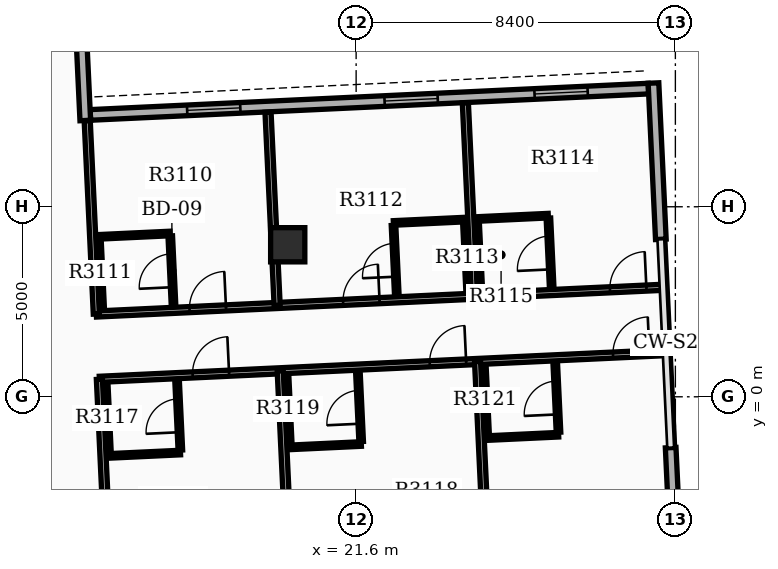
"""IFC4 building model, lengths in metres.
Left out: names, types, materials, properties, quantities, classifications, styles, units other than length and angle.
Written with IfcOpenShell. Run it as: python <this file> out.ifc"""

import sys

from ifc_helpers import new_model, si_unit, direction, frame, frame_2d, origin, origin_2d, place, context, subcontext, project, spatial, rectangle, extrude, element, fill, save


model = new_model("IFC4")
c1 = context("Model", 3, precision=1e-05, world=origin(), true_north=direction((0.0, 1.0)))
c2 = subcontext(c1, "Body", "Model", "MODEL_VIEW")
j1 = project(units=[si_unit("LENGTHUNIT", "METRE"), si_unit("PLANEANGLEUNIT", "RADIAN")], contexts=[c1])
p1 = place(None, origin())
s1 = spatial("IfcSite", under=j1, at=p1, CompositionType="ELEMENT")
p2 = place(p1, origin())
s2 = spatial("IfcBuilding", under=s1, at=p2, CompositionType="ELEMENT")
p3 = place(p2, frame((0.0, 0.0, 196.8)))
s3 = spatial("IfcBuildingStorey", under=s2, at=p3, CompositionType="ELEMENT", Elevation=196.8)
p4 = place(p3, frame((19.8, 4.0, 0.0), z_axis=(0.0, 0.0, 1.0), x_axis=(1.0, 0.0, 0.0)))
e1 = element("IfcColumn", 1, at=p4, inside=s3, PredefinedType="COLUMN", context=c2, shape_type="SweptSolid", body=[
    extrude(rectangle(XDim=0.9, YDim=0.9, at=origin_2d()), origin(), (0.0, 0.0, 1.0), 4.5),
])
p5 = place(p3, frame((29.291, 8.109, 0.0), z_axis=(0.0, 0.0, 1.0), x_axis=(-0.998889342735, -0.047117735191, 0.0)))
e2 = element("IfcWall", 2, at=p5, inside=s3, PredefinedType="STANDARD", context=c2, shape_type="SweptSolid", body=[
    extrude(rectangle(XDim=14.7, YDim=0.28, at=frame_2d((7.35, 0.0))), origin(), (0.0, 0.0, 1.0), 3.38),
])
p6 = place(p5, frame((1.6, 0.0, 0.8)))
e3 = element("IfcOpeningElement", 3, at=p6, cuts=e2, PredefinedType="OPENING", context=c2, shape_type="SweptSolid", body=[
    extrude(rectangle(XDim=1.4, YDim=1.6, at=frame_2d((0.7, 0.8))), frame((0.0, 0.15, 0.0), z_axis=(0.0, -1.0, 0.0), x_axis=(1.0, 0.0, 0.0)), (0.0, 0.0, 1.0), 0.3),
])
p7 = place(p5, frame((5.55, 0.0, 0.8)))
e4 = element("IfcOpeningElement", 4, at=p7, cuts=e2, PredefinedType="OPENING", context=c2, shape_type="SweptSolid", body=[
    extrude(rectangle(XDim=1.4, YDim=1.6, at=frame_2d((0.7, 0.8))), frame((0.0, 0.15, 0.0), z_axis=(0.0, -1.0, 0.0), x_axis=(1.0, 0.0, 0.0)), (0.0, 0.0, 1.0), 0.3),
])
p8 = place(p5, frame((10.75, 0.0, 0.8)))
e5 = element("IfcOpeningElement", 5, at=p8, cuts=e2, PredefinedType="OPENING", context=c2, shape_type="SweptSolid", body=[
    extrude(rectangle(XDim=1.4, YDim=1.6, at=frame_2d((0.7, 0.8))), frame((0.0, 0.15, 0.0), z_axis=(0.0, -1.0, 0.0), x_axis=(1.0, 0.0, 0.0)), (0.0, 0.0, 1.0), 0.3),
])
p9 = place(p3, frame((30.07, -5.45, 0.0), z_axis=(0.0, 0.0, 1.0), x_axis=(-0.047094531617, 0.998890436981, 0.0)))
e6 = element("IfcWall", 6, at=p9, inside=s3, PredefinedType="STANDARD", context=c2, shape_type="SweptSolid", body=[
    extrude(rectangle(XDim=4.116, YDim=0.28, at=frame_2d((2.058, 0.0))), origin(), (0.0, 0.0, 1.0), 3.38),
])
p10 = place(p3, frame((29.618, 4.144, 0.0), z_axis=(0.0, 0.0, 1.0), x_axis=(-0.047097322001, 0.998890305419, 0.0)))
e7 = element("IfcWall", 7, at=p10, inside=s3, PredefinedType="STANDARD", context=c2, shape_type="SweptSolid", body=[
    extrude(rectangle(XDim=4.116, YDim=0.28, at=frame_2d((2.058, 0.0))), origin(), (0.0, 0.0, 1.0), 3.38),
])
p11 = place(p3, frame((14.474, 7.27, 0.0), z_axis=(0.0, 0.0, 1.0), x_axis=(-0.04712043756, 0.998889215261, 0.0)))
e8 = element("IfcWall", 8, at=p11, inside=s3, PredefinedType="STANDARD", context=c2, shape_type="SweptSolid", body=[
    extrude(rectangle(XDim=6.86, YDim=0.28, at=frame_2d((3.43, 0.0))), origin(), (0.0, 0.0, 1.0), 3.38),
])
p12 = place(p3, frame((14.764, 2.178, 0.0), z_axis=(0.0, 0.0, 1.0), x_axis=(0.998890410031, 0.047095103231, 0.0)))
e9 = element("IfcWall", 9, at=p12, inside=s3, PredefinedType="PARTITIONING", context=c2, shape_type="SweptSolid", body=[
    extrude(rectangle(XDim=14.93, YDim=0.16, at=frame_2d((7.465, 0.0))), origin(), (0.0, 0.0, 1.0), 3.37),
])
p13 = place(p12, frame((2.456, 0.0, 0.0)))
e10 = element("IfcOpeningElement", 10, at=p13, cuts=e9, PredefinedType="OPENING", context=c2, shape_type="SweptSolid", body=[
    extrude(rectangle(XDim=0.96, YDim=2.15, at=frame_2d((0.48, 1.075))), frame((0.0, 0.09, 0.0), z_axis=(0.0, -1.0, 0.0), x_axis=(1.0, 0.0, 0.0)), (0.0, 0.0, 1.0), 0.18),
])
p14 = place(p12, frame((6.501, 0.0, 0.0)))
e11 = element("IfcOpeningElement", 11, at=p14, cuts=e9, PredefinedType="OPENING", context=c2, shape_type="SweptSolid", body=[
    extrude(rectangle(XDim=0.96, YDim=2.15, at=frame_2d((0.48, 1.075))), frame((0.0, 0.09, 0.0), z_axis=(0.0, -1.0, 0.0), x_axis=(1.0, 0.0, 0.0)), (0.0, 0.0, 1.0), 0.18),
])
p15 = place(p12, frame((13.53, 0.0, 0.0)))
e12 = element("IfcOpeningElement", 12, at=p15, cuts=e9, PredefinedType="OPENING", context=c2, shape_type="SweptSolid", body=[
    extrude(rectangle(XDim=0.96, YDim=2.15, at=frame_2d((0.48, 1.075))), frame((0.0, 0.09, 0.0), z_axis=(0.0, -1.0, 0.0), x_axis=(1.0, 0.0, 0.0)), (0.0, 0.0, 1.0), 0.18),
])
p16 = place(p3, frame((14.764, 2.178, 0.0), z_axis=(0.0, 0.0, 1.0), x_axis=(-0.047130059153, 0.998888761336, 0.0)))
e13 = element("IfcWall", 13, at=p16, inside=s3, PredefinedType="PARTITIONING", context=c2, shape_type="SweptSolid", body=[
    extrude(rectangle(XDim=5.092, YDim=0.16, at=frame_2d((2.546, 0.0))), origin(), (0.0, 0.0, 1.0), 3.37),
])
p17 = place(p3, frame((19.521, 2.402, 0.0), z_axis=(0.0, 0.0, 1.0), x_axis=(-0.047084475335, 0.998890911052, 0.0)))
e14 = element("IfcWall", 14, at=p17, inside=s3, PredefinedType="PARTITIONING", context=c2, shape_type="SweptSolid", body=[
    extrude(rectangle(XDim=5.092, YDim=0.16, at=frame_2d((2.546, 0.0))), origin(), (0.0, 0.0, 1.0), 3.37),
])
p18 = place(p3, frame((16.795, 2.414, 0.0), z_axis=(0.0, 0.0, 1.0), x_axis=(-0.047087116047, 0.998890786574, 0.0)))
e15 = element("IfcWall", 15, at=p18, inside=s3, PredefinedType="PARTITIONING", context=c2, shape_type="SweptSolid", body=[
    extrude(rectangle(XDim=1.82, YDim=0.12, at=frame_2d((0.91, 0.0))), origin(), (0.0, 0.0, 1.0), 3.37),
])
p19 = place(p18, frame((0.47, 0.0, 0.0)))
e16 = element("IfcOpeningElement", 16, at=p19, cuts=e15, PredefinedType="OPENING", context=c2, shape_type="SweptSolid", body=[
    extrude(rectangle(XDim=0.88, YDim=2.1, at=frame_2d((0.44, 1.05))), frame((0.0, 0.07, 0.0), z_axis=(0.0, -1.0, 0.0), x_axis=(1.0, 0.0, 0.0)), (0.0, 0.0, 1.0), 0.14),
])
p20 = place(p3, frame((14.917, 2.325, 0.0), z_axis=(0.0, 0.0, 1.0), x_axis=(-0.047080807099, 0.998891083954, 0.0)))
e17 = element("IfcWall", 17, at=p20, inside=s3, PredefinedType="PARTITIONING", context=c2, shape_type="SweptSolid", body=[
    extrude(rectangle(XDim=1.82, YDim=0.12, at=frame_2d((0.91, 0.0))), origin(), (0.0, 0.0, 1.0), 3.37),
])
p21 = place(p3, frame((14.828, 4.208, 0.0), z_axis=(0.0, 0.0, 1.0), x_axis=(0.998894425757, 0.04700985207, 0.0)))
e18 = element("IfcWall", 18, at=p21, inside=s3, PredefinedType="PARTITIONING", context=c2, shape_type="SweptSolid", body=[
    extrude(rectangle(XDim=1.88, YDim=0.12, at=frame_2d((0.94, 0.0))), origin(), (0.0, 0.0, 1.0), 3.37),
])
p22 = place(p3, frame((24.714, 2.647, 0.0), z_axis=(0.0, 0.0, 1.0), x_axis=(-0.047084475335, 0.998890911052, 0.0)))
e19 = element("IfcWall", 19, at=p22, inside=s3, PredefinedType="PARTITIONING", context=c2, shape_type="SweptSolid", body=[
    extrude(rectangle(XDim=5.092, YDim=0.16, at=frame_2d((2.546, 0.0))), origin(), (0.0, 0.0, 1.0), 3.37),
])
p23 = place(p3, frame((22.669, 2.691, 0.0), z_axis=(0.0, 0.0, 1.0), x_axis=(-0.047087116047, 0.998890786574, 0.0)))
e20 = element("IfcWall", 20, at=p23, inside=s3, PredefinedType="PARTITIONING", context=c2, shape_type="SweptSolid", body=[
    extrude(rectangle(XDim=1.82, YDim=0.12, at=frame_2d((0.91, 0.0))), origin(), (0.0, 0.0, 1.0), 3.37),
])
p24 = place(p23, frame((0.47, 0.0, 0.0)))
e21 = element("IfcOpeningElement", 21, at=p24, cuts=e20, PredefinedType="OPENING", context=c2, shape_type="SweptSolid", body=[
    extrude(rectangle(XDim=0.88, YDim=2.1, at=frame_2d((0.44, 1.05))), frame((0.0, 0.07, 0.0), z_axis=(0.0, -1.0, 0.0), x_axis=(1.0, 0.0, 0.0)), (0.0, 0.0, 1.0), 0.14),
])
p25 = place(p3, frame((24.547, 2.779, 0.0), z_axis=(0.0, 0.0, 1.0), x_axis=(-0.047080807099, 0.998891083954, 0.0)))
e22 = element("IfcWall", 22, at=p25, inside=s3, PredefinedType="PARTITIONING", context=c2, shape_type="SweptSolid", body=[
    extrude(rectangle(XDim=1.82, YDim=0.12, at=frame_2d((0.91, 0.0))), origin(), (0.0, 0.0, 1.0), 3.37),
])
p26 = place(p3, frame((22.581, 4.574, 0.0), z_axis=(0.0, 0.0, 1.0), x_axis=(0.998888319371, 0.047139425368, 0.0)))
e23 = element("IfcWall", 23, at=p26, inside=s3, PredefinedType="PARTITIONING", context=c2, shape_type="SweptSolid", body=[
    extrude(rectangle(XDim=1.88, YDim=0.12, at=frame_2d((0.94, 0.0))), origin(), (0.0, 0.0, 1.0), 3.37),
])
p27 = place(p3, frame((26.745, 2.883, 0.0), z_axis=(0.0, 0.0, 1.0), x_axis=(-0.047087116047, 0.998890786574, 0.0)))
e24 = element("IfcWall", 24, at=p27, inside=s3, PredefinedType="PARTITIONING", context=c2, shape_type="SweptSolid", body=[
    extrude(rectangle(XDim=1.82, YDim=0.12, at=frame_2d((0.91, 0.0))), origin(), (0.0, 0.0, 1.0), 3.37),
])
p28 = place(p27, frame((0.47, 0.0, 0.0)))
e25 = element("IfcOpeningElement", 25, at=p28, cuts=e24, PredefinedType="OPENING", context=c2, shape_type="SweptSolid", body=[
    extrude(rectangle(XDim=0.88, YDim=2.1, at=frame_2d((0.44, 1.05))), frame((0.0, 0.07, 0.0), z_axis=(0.0, -1.0, 0.0), x_axis=(1.0, 0.0, 0.0)), (0.0, 0.0, 1.0), 0.14),
])
p29 = place(p3, frame((24.867, 2.794, 0.0), z_axis=(0.0, 0.0, 1.0), x_axis=(-0.047080807099, 0.998891083954, 0.0)))
e26 = element("IfcWall", 26, at=p29, inside=s3, PredefinedType="PARTITIONING", context=c2, shape_type="SweptSolid", body=[
    extrude(rectangle(XDim=1.82, YDim=0.12, at=frame_2d((0.91, 0.0))), origin(), (0.0, 0.0, 1.0), 3.37),
])
p30 = place(p3, frame((24.778, 4.677, 0.0), z_axis=(0.0, 0.0, 1.0), x_axis=(0.998888030748, 0.047145540913, 0.0)))
e27 = element("IfcWall", 27, at=p30, inside=s3, PredefinedType="PARTITIONING", context=c2, shape_type="SweptSolid", body=[
    extrude(rectangle(XDim=1.88, YDim=0.12, at=frame_2d((0.94, 0.0))), origin(), (0.0, 0.0, 1.0), 3.37),
])
p31 = place(p3, frame((14.845, 0.46, 0.0), z_axis=(0.0, 0.0, 1.0), x_axis=(0.998889676925, 0.047110649891, 0.0)))
e28 = element("IfcWall", 28, at=p31, inside=s3, PredefinedType="PARTITIONING", context=c2, shape_type="SweptSolid", body=[
    extrude(rectangle(XDim=14.93, YDim=0.16, at=frame_2d((7.465, 0.0))), origin(), (0.0, 0.0, 1.0), 3.37),
])
p32 = place(p31, frame((2.456, 0.0, 0.0)))
e29 = element("IfcOpeningElement", 29, at=p32, cuts=e28, PredefinedType="OPENING", context=c2, shape_type="SweptSolid", body=[
    extrude(rectangle(XDim=0.96, YDim=2.15, at=frame_2d((0.48, 1.075))), frame((0.0, 0.09, 0.0), z_axis=(0.0, -1.0, 0.0), x_axis=(1.0, 0.0, 0.0)), (0.0, 0.0, 1.0), 0.18),
])
p33 = place(p31, frame((8.701, 0.0, 0.0)))
e30 = element("IfcOpeningElement", 30, at=p33, cuts=e28, PredefinedType="OPENING", context=c2, shape_type="SweptSolid", body=[
    extrude(rectangle(XDim=0.96, YDim=2.15, at=frame_2d((0.48, 1.075))), frame((0.0, 0.09, 0.0), z_axis=(0.0, -1.0, 0.0), x_axis=(1.0, 0.0, 0.0)), (0.0, 0.0, 1.0), 0.18),
])
p34 = place(p31, frame((13.53, 0.0, 0.0)))
e31 = element("IfcOpeningElement", 31, at=p34, cuts=e28, PredefinedType="OPENING", context=c2, shape_type="SweptSolid", body=[
    extrude(rectangle(XDim=0.96, YDim=2.15, at=frame_2d((0.48, 1.075))), frame((0.0, 0.09, 0.0), z_axis=(0.0, -1.0, 0.0), x_axis=(1.0, 0.0, 0.0)), (0.0, 0.0, 1.0), 0.18),
])
for number, where, z_axis, x_axis in (
    (32, (14.845, 0.46, 0.0), (0.0, 0.0, 1.0), (0.047, -0.999, 0.0)),
    (33, (19.603, 0.684, 0.0), (0.0, 0.0, 1.0), (0.047, -0.999, 0.0)),
):
    element("IfcWall", number, at=place(p3, frame(where, z_axis=z_axis, x_axis=x_axis)), inside=s3, PredefinedType="PARTITIONING", context=c2, shape_type="SweptSolid", body=[
        extrude(rectangle(XDim=6.332, YDim=0.16, at=frame_2d((3.166, 0.0))), origin(), (0.0, 0.0, 1.0), 3.37),
    ])
p35 = place(p3, frame((16.975, -1.402, 0.0), z_axis=(0.0, 0.0, 1.0), x_axis=(-0.047087116047, 0.998890786574, 0.0)))
e34 = element("IfcWall", 34, at=p35, inside=s3, PredefinedType="PARTITIONING", context=c2, shape_type="SweptSolid", body=[
    extrude(rectangle(XDim=1.82, YDim=0.12, at=frame_2d((0.91, 0.0))), origin(), (0.0, 0.0, 1.0), 3.37),
])
p36 = place(p35, frame((0.47, 0.0, 0.0)))
e35 = element("IfcOpeningElement", 35, at=p36, cuts=e34, PredefinedType="OPENING", context=c2, shape_type="SweptSolid", body=[
    extrude(rectangle(XDim=0.88, YDim=2.1, at=frame_2d((0.44, 1.05))), frame((0.0, 0.07, 0.0), z_axis=(0.0, -1.0, 0.0), x_axis=(1.0, 0.0, 0.0)), (0.0, 0.0, 1.0), 0.14),
])
p37 = place(p3, frame((15.097, -1.49, 0.0), z_axis=(0.0, 0.0, 1.0), x_axis=(-0.047087116047, 0.998890786574, 0.0)))
e36 = element("IfcWall", 36, at=p37, inside=s3, PredefinedType="PARTITIONING", context=c2, shape_type="SweptSolid", body=[
    extrude(rectangle(XDim=1.82, YDim=0.12, at=frame_2d((0.91, 0.0))), origin(), (0.0, 0.0, 1.0), 3.37),
])
p38 = place(p3, frame((15.1, -1.555, 0.0), z_axis=(0.0, 0.0, 1.0), x_axis=(0.998888030748, 0.047145540913, 0.0)))
e37 = element("IfcWall", 37, at=p38, inside=s3, PredefinedType="PARTITIONING", context=c2, shape_type="SweptSolid", body=[
    extrude(rectangle(XDim=1.88, YDim=0.12, at=frame_2d((0.94, 0.0))), origin(), (0.0, 0.0, 1.0), 3.37),
])
p39 = place(p3, frame((24.795, 0.929, 0.0), z_axis=(0.0, 0.0, 1.0), x_axis=(0.047077862468, -0.998891222739, 0.0)))
e38 = element("IfcWall", 38, at=p39, inside=s3, PredefinedType="PARTITIONING", context=c2, shape_type="SweptSolid", body=[
    extrude(rectangle(XDim=6.332, YDim=0.16, at=frame_2d((3.166, 0.0))), origin(), (0.0, 0.0, 1.0), 3.37),
])
p40 = place(p3, frame((21.733, -1.177, 0.0), z_axis=(0.0, 0.0, 1.0), x_axis=(-0.047087116047, 0.998890786574, 0.0)))
e39 = element("IfcWall", 39, at=p40, inside=s3, PredefinedType="PARTITIONING", context=c2, shape_type="SweptSolid", body=[
    extrude(rectangle(XDim=1.82, YDim=0.12, at=frame_2d((0.91, 0.0))), origin(), (0.0, 0.0, 1.0), 3.37),
])
p41 = place(p40, frame((0.47, 0.0, 0.0)))
e40 = element("IfcOpeningElement", 40, at=p41, cuts=e39, PredefinedType="OPENING", context=c2, shape_type="SweptSolid", body=[
    extrude(rectangle(XDim=0.88, YDim=2.1, at=frame_2d((0.44, 1.05))), frame((0.0, 0.07, 0.0), z_axis=(0.0, -1.0, 0.0), x_axis=(1.0, 0.0, 0.0)), (0.0, 0.0, 1.0), 0.14),
])
p42 = place(p3, frame((19.855, -1.266, 0.0), z_axis=(0.0, 0.0, 1.0), x_axis=(-0.047214641863, 0.998884766924, 0.0)))
e41 = element("IfcWall", 41, at=p42, inside=s3, PredefinedType="PARTITIONING", context=c2, shape_type="SweptSolid", body=[
    extrude(rectangle(XDim=1.82, YDim=0.12, at=frame_2d((0.91, 0.0))), origin(), (0.0, 0.0, 1.0), 3.37),
])
p43 = place(p3, frame((19.858, -1.331, 0.0), z_axis=(0.0, 0.0, 1.0), x_axis=(0.998888319371, 0.047139425368, 0.0)))
e42 = element("IfcWall", 42, at=p43, inside=s3, PredefinedType="PARTITIONING", context=c2, shape_type="SweptSolid", body=[
    extrude(rectangle(XDim=1.88, YDim=0.12, at=frame_2d((0.94, 0.0))), origin(), (0.0, 0.0, 1.0), 3.37),
])
p44 = place(p3, frame((26.925, -0.933, 0.0), z_axis=(0.0, 0.0, 1.0), x_axis=(-0.047087116047, 0.998890786574, 0.0)))
e43 = element("IfcWall", 43, at=p44, inside=s3, PredefinedType="PARTITIONING", context=c2, shape_type="SweptSolid", body=[
    extrude(rectangle(XDim=1.82, YDim=0.12, at=frame_2d((0.91, 0.0))), origin(), (0.0, 0.0, 1.0), 3.37),
])
p45 = place(p44, frame((0.47, 0.0, 0.0)))
e44 = element("IfcOpeningElement", 44, at=p45, cuts=e43, PredefinedType="OPENING", context=c2, shape_type="SweptSolid", body=[
    extrude(rectangle(XDim=0.88, YDim=2.1, at=frame_2d((0.44, 1.05))), frame((0.0, 0.07, 0.0), z_axis=(0.0, -1.0, 0.0), x_axis=(1.0, 0.0, 0.0)), (0.0, 0.0, 1.0), 0.14),
])
p46 = place(p3, frame((25.047, -1.021, 0.0), z_axis=(0.0, 0.0, 1.0), x_axis=(-0.047087116047, 0.998890786574, 0.0)))
e45 = element("IfcWall", 45, at=p46, inside=s3, PredefinedType="PARTITIONING", context=c2, shape_type="SweptSolid", body=[
    extrude(rectangle(XDim=1.82, YDim=0.12, at=frame_2d((0.91, 0.0))), origin(), (0.0, 0.0, 1.0), 3.37),
])
p47 = place(p3, frame((25.05, -1.086, 0.0), z_axis=(0.0, 0.0, 1.0), x_axis=(0.998888319371, 0.047139425368, 0.0)))
e46 = element("IfcWall", 46, at=p47, inside=s3, PredefinedType="PARTITIONING", context=c2, shape_type="SweptSolid", body=[
    extrude(rectangle(XDim=1.88, YDim=0.12, at=frame_2d((0.94, 0.0))), origin(), (0.0, 0.0, 1.0), 3.37),
])
p48 = place(p6, origin())
e47 = element("IfcWindow", 47, at=p48, inside=s3, PartitioningType="SINGLE_PANEL", PredefinedType="WINDOW", context=c2, shape_type="SweptSolid", body=[
    extrude(rectangle(XDim=1.4, YDim=1.6, at=frame_2d((0.7, 0.8))), frame((0.0, 0.03, 0.0), z_axis=(0.0, -1.0, 0.0), x_axis=(1.0, 0.0, 0.0)), (0.0, 0.0, 1.0), 0.06),
])
fill(e3, e47)
p49 = place(p7, origin())
e48 = element("IfcWindow", 48, at=p49, inside=s3, PartitioningType="SINGLE_PANEL", PredefinedType="WINDOW", context=c2, shape_type="SweptSolid", body=[
    extrude(rectangle(XDim=1.4, YDim=1.6, at=frame_2d((0.7, 0.8))), frame((0.0, 0.03, 0.0), z_axis=(0.0, -1.0, 0.0), x_axis=(1.0, 0.0, 0.0)), (0.0, 0.0, 1.0), 0.06),
])
fill(e4, e48)
p50 = place(p8, origin())
e49 = element("IfcWindow", 49, at=p50, inside=s3, PartitioningType="SINGLE_PANEL", PredefinedType="WINDOW", context=c2, shape_type="SweptSolid", body=[
    extrude(rectangle(XDim=1.4, YDim=1.6, at=frame_2d((0.7, 0.8))), frame((0.0, 0.03, 0.0), z_axis=(0.0, -1.0, 0.0), x_axis=(1.0, 0.0, 0.0)), (0.0, 0.0, 1.0), 0.06),
])
fill(e5, e49)
p51 = place(p13, origin())
e50 = element("IfcDoor", 50, at=p51, inside=s3, OperationType="SINGLE_SWING_RIGHT", PredefinedType="DOOR", context=c2, shape_type="SweptSolid", body=[
    extrude(rectangle(XDim=0.96, YDim=2.15, at=frame_2d((0.48, 1.075))), frame((0.0, 0.025, 0.0), z_axis=(0.0, -1.0, 0.0), x_axis=(1.0, 0.0, 0.0)), (0.0, 0.0, 1.0), 0.05),
])
fill(e10, e50)
p52 = place(p19, origin())
e51 = element("IfcDoor", 51, at=p52, inside=s3, OperationType="SINGLE_SWING_LEFT", PredefinedType="DOOR", context=c2, shape_type="SweptSolid", body=[
    extrude(rectangle(XDim=0.88, YDim=2.1, at=frame_2d((0.44, 1.05))), frame((0.0, 0.025, 0.0), z_axis=(0.0, -1.0, 0.0), x_axis=(1.0, 0.0, 0.0)), (0.0, 0.0, 1.0), 0.05),
])
fill(e16, e51)
p53 = place(p14, origin())
e52 = element("IfcDoor", 52, at=p53, inside=s3, OperationType="SINGLE_SWING_RIGHT", PredefinedType="DOOR", context=c2, shape_type="SweptSolid", body=[
    extrude(rectangle(XDim=0.96, YDim=2.15, at=frame_2d((0.48, 1.075))), frame((0.0, 0.025, 0.0), z_axis=(0.0, -1.0, 0.0), x_axis=(1.0, 0.0, 0.0)), (0.0, 0.0, 1.0), 0.05),
])
fill(e11, e52)
p54 = place(p24, origin())
e53 = element("IfcDoor", 53, at=p54, inside=s3, OperationType="SINGLE_SWING_LEFT", PredefinedType="DOOR", context=c2, shape_type="SweptSolid", body=[
    extrude(rectangle(XDim=0.88, YDim=2.1, at=frame_2d((0.44, 1.05))), frame((0.0, 0.025, 0.0), z_axis=(0.0, -1.0, 0.0), x_axis=(1.0, 0.0, 0.0)), (0.0, 0.0, 1.0), 0.05),
])
fill(e21, e53)
p55 = place(p15, origin())
e54 = element("IfcDoor", 54, at=p55, inside=s3, OperationType="SINGLE_SWING_RIGHT", PredefinedType="DOOR", context=c2, shape_type="SweptSolid", body=[
    extrude(rectangle(XDim=0.96, YDim=2.15, at=frame_2d((0.48, 1.075))), frame((0.0, 0.025, 0.0), z_axis=(0.0, -1.0, 0.0), x_axis=(1.0, 0.0, 0.0)), (0.0, 0.0, 1.0), 0.05),
])
fill(e12, e54)
p56 = place(p28, origin())
e55 = element("IfcDoor", 55, at=p56, inside=s3, OperationType="SINGLE_SWING_LEFT", PredefinedType="DOOR", context=c2, shape_type="SweptSolid", body=[
    extrude(rectangle(XDim=0.88, YDim=2.1, at=frame_2d((0.44, 1.05))), frame((0.0, 0.025, 0.0), z_axis=(0.0, -1.0, 0.0), x_axis=(1.0, 0.0, 0.0)), (0.0, 0.0, 1.0), 0.05),
])
fill(e25, e55)
p57 = place(p32, origin())
e56 = element("IfcDoor", 56, at=p57, inside=s3, OperationType="SINGLE_SWING_RIGHT", PredefinedType="DOOR", context=c2, shape_type="SweptSolid", body=[
    extrude(rectangle(XDim=0.96, YDim=2.15, at=frame_2d((0.48, 1.075))), frame((0.0, 0.025, 0.0), z_axis=(0.0, -1.0, 0.0), x_axis=(1.0, 0.0, 0.0)), (0.0, 0.0, 1.0), 0.05),
])
fill(e29, e56)
p58 = place(p36, origin())
e57 = element("IfcDoor", 57, at=p58, inside=s3, OperationType="SINGLE_SWING_LEFT", PredefinedType="DOOR", context=c2, shape_type="SweptSolid", body=[
    extrude(rectangle(XDim=0.88, YDim=2.1, at=frame_2d((0.44, 1.05))), frame((0.0, 0.025, 0.0), z_axis=(0.0, -1.0, 0.0), x_axis=(1.0, 0.0, 0.0)), (0.0, 0.0, 1.0), 0.05),
])
fill(e35, e57)
p59 = place(p33, origin())
e58 = element("IfcDoor", 58, at=p59, inside=s3, OperationType="SINGLE_SWING_RIGHT", PredefinedType="DOOR", context=c2, shape_type="SweptSolid", body=[
    extrude(rectangle(XDim=0.96, YDim=2.15, at=frame_2d((0.48, 1.075))), frame((0.0, 0.025, 0.0), z_axis=(0.0, -1.0, 0.0), x_axis=(1.0, 0.0, 0.0)), (0.0, 0.0, 1.0), 0.05),
])
fill(e30, e58)
p60 = place(p41, origin())
e59 = element("IfcDoor", 59, at=p60, inside=s3, OperationType="SINGLE_SWING_LEFT", PredefinedType="DOOR", context=c2, shape_type="SweptSolid", body=[
    extrude(rectangle(XDim=0.88, YDim=2.1, at=frame_2d((0.44, 1.05))), frame((0.0, 0.025, 0.0), z_axis=(0.0, -1.0, 0.0), x_axis=(1.0, 0.0, 0.0)), (0.0, 0.0, 1.0), 0.05),
])
fill(e40, e59)
p61 = place(p34, origin())
e60 = element("IfcDoor", 60, at=p61, inside=s3, OperationType="SINGLE_SWING_RIGHT", PredefinedType="DOOR", context=c2, shape_type="SweptSolid", body=[
    extrude(rectangle(XDim=0.96, YDim=2.15, at=frame_2d((0.48, 1.075))), frame((0.0, 0.025, 0.0), z_axis=(0.0, -1.0, 0.0), x_axis=(1.0, 0.0, 0.0)), (0.0, 0.0, 1.0), 0.05),
])
fill(e31, e60)
p62 = place(p45, origin())
e61 = element("IfcDoor", 61, at=p62, inside=s3, OperationType="SINGLE_SWING_LEFT", PredefinedType="DOOR", context=c2, shape_type="SweptSolid", body=[
    extrude(rectangle(XDim=0.88, YDim=2.1, at=frame_2d((0.44, 1.05))), frame((0.0, 0.025, 0.0), z_axis=(0.0, -1.0, 0.0), x_axis=(1.0, 0.0, 0.0)), (0.0, 0.0, 1.0), 0.05),
])
fill(e44, e61)
save(model, sys.argv[1])
